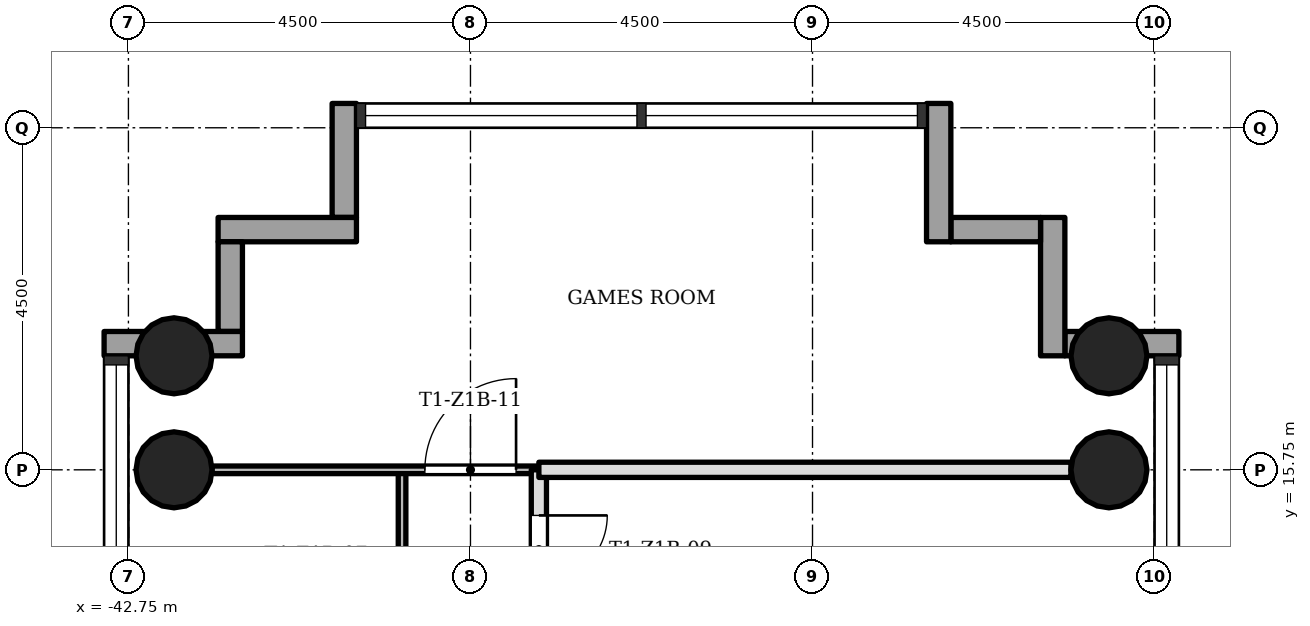
"""IFC4 building model, lengths in metres.
Left out: names, types, materials, properties, quantities, classifications, styles, units other than length and angle.
Written with IfcOpenShell. Run it as: python <this file> out.ifc"""

import sys

from ifc_helpers import new_model, si_unit, direction, frame, frame_2d, origin, origin_2d, place, context, subcontext, project, spatial, rectangle, hollow_circle, extrude, element, fill, save


model = new_model("IFC4")
c1 = context("Model", 3, precision=1e-05, world=origin(), true_north=direction((0.0, 1.0)))
c2 = subcontext(c1, "Body", "Model", "MODEL_VIEW")
j1 = project(units=[si_unit("LENGTHUNIT", "METRE"), si_unit("PLANEANGLEUNIT", "RADIAN")], contexts=[c1])
p1 = place(None, origin())
s1 = spatial("IfcSite", under=j1, at=p1, CompositionType="ELEMENT")
p2 = place(p1, origin())
s2 = spatial("IfcBuilding", under=s1, at=p2, CompositionType="ELEMENT")
p3 = place(p2, frame((0.0, 0.0, 34.7)))
s3 = spatial("IfcBuildingStorey", under=s2, at=p3, CompositionType="ELEMENT", Elevation=34.7)
for number, where, z_axis, x_axis in (
    (1, (-29.85, 15.75, 0.0), (0.0, 0.0, 1.0), (1.0, 0.0, 0.0)),
    (2, (-42.15, 15.75, 0.0), (0.0, 0.0, 1.0), (1.0, 0.0, 0.0)),
    (3, (-29.85, 17.25, 0.0), (0.0, 0.0, 1.0), (1.0, 0.0, 0.0)),
    (4, (-42.15, 17.25, 0.0), (0.0, 0.0, 1.0), (1.0, 0.0, 0.0)),
):
    element("IfcColumn", number, at=place(p3, frame(where, z_axis=z_axis, x_axis=x_axis)), inside=s3, PredefinedType="COLUMN", context=c2, shape_type="SweptSolid", body=[
        extrude(hollow_circle(Radius=0.5, WallThickness=0.036, at=origin_2d()), origin(), (0.0, 0.0, 1.0), 3.4),
    ])
p4 = place(p3, frame((-28.93, 17.41, -0.3), z_axis=(0.0, 0.0, 1.0), x_axis=(-1.0, 0.0, 0.0)))
e5 = element("IfcWall", 5, at=p4, inside=s3, PredefinedType="STANDARD", context=c2, shape_type="SweptSolid", body=[
    extrude(rectangle(XDim=1.5, YDim=0.32, at=frame_2d((0.75, 0.0))), origin(), (0.0, 0.0, 1.0), 3.4),
])
p5 = place(p3, frame((-30.59, 17.25, -0.3), z_axis=(0.0, 0.0, 1.0), x_axis=(0.0, 1.0, 0.0)))
e6 = element("IfcWall", 6, at=p5, inside=s3, PredefinedType="STANDARD", context=c2, shape_type="SweptSolid", body=[
    extrude(rectangle(XDim=1.82, YDim=0.32, at=frame_2d((0.91, 0.0))), origin(), (0.0, 0.0, 1.0), 3.4),
])
p6 = place(p3, frame((-30.75, 18.91, -0.3), z_axis=(0.0, 0.0, 1.0), x_axis=(-1.0, 0.0, 0.0)))
e7 = element("IfcWall", 7, at=p6, inside=s3, PredefinedType="STANDARD", context=c2, shape_type="SweptSolid", body=[
    extrude(rectangle(XDim=1.18, YDim=0.32, at=frame_2d((0.59, 0.0))), origin(), (0.0, 0.0, 1.0), 3.4),
])
p7 = place(p3, frame((-32.09, 18.75, -0.3), z_axis=(0.0, 0.0, 1.0), x_axis=(0.0, 1.0, 0.0)))
e8 = element("IfcWall", 8, at=p7, inside=s3, PredefinedType="STANDARD", context=c2, shape_type="SweptSolid", body=[
    extrude(rectangle(XDim=1.82, YDim=0.32, at=frame_2d((0.91, 0.0))), origin(), (0.0, 0.0, 1.0), 3.4),
])
p8 = place(p3, frame((-39.91, 20.57, -0.3), z_axis=(0.0, 0.0, 1.0), x_axis=(0.0, -1.0, 0.0)))
e9 = element("IfcWall", 9, at=p8, inside=s3, PredefinedType="STANDARD", context=c2, shape_type="SweptSolid", body=[
    extrude(rectangle(XDim=1.5, YDim=0.32, at=frame_2d((0.75, 0.0))), origin(), (0.0, 0.0, 1.0), 3.4),
])
p9 = place(p3, frame((-39.75, 18.91, -0.3), z_axis=(0.0, 0.0, 1.0), x_axis=(-1.0, 0.0, 0.0)))
e10 = element("IfcWall", 10, at=p9, inside=s3, PredefinedType="STANDARD", context=c2, shape_type="SweptSolid", body=[
    extrude(rectangle(XDim=1.82, YDim=0.32, at=frame_2d((0.91, 0.0))), origin(), (0.0, 0.0, 1.0), 3.4),
])
p10 = place(p3, frame((-41.41, 18.75, -0.3), z_axis=(0.0, 0.0, 1.0), x_axis=(0.0, -1.0, 0.0)))
e11 = element("IfcWall", 11, at=p10, inside=s3, PredefinedType="STANDARD", context=c2, shape_type="SweptSolid", body=[
    extrude(rectangle(XDim=1.18, YDim=0.32, at=frame_2d((0.59, 0.0))), origin(), (0.0, 0.0, 1.0), 3.4),
])
p11 = place(p3, frame((-41.25, 17.41, -0.3), z_axis=(0.0, 0.0, 1.0), x_axis=(-1.0, 0.0, 0.0)))
e12 = element("IfcWall", 12, at=p11, inside=s3, PredefinedType="STANDARD", context=c2, shape_type="SweptSolid", body=[
    extrude(rectangle(XDim=1.82, YDim=0.32, at=frame_2d((0.91, 0.0))), origin(), (0.0, 0.0, 1.0), 3.4),
])
p12 = place(p3, frame((-39.15, 6.75, 0.0), z_axis=(0.0, 0.0, 1.0), x_axis=(0.0, 1.0, 0.0)))
e13 = element("IfcWall", 13, at=p12, inside=s3, PredefinedType="PARTITIONING", context=c2, shape_type="SweptSolid", body=[
    extrude(rectangle(XDim=9.0, YDim=0.1, at=frame_2d((4.5, 0.0))), origin(), (0.0, 0.0, 1.0), 3.0),
])
p13 = place(p12, frame((1.8, 0.0, 0.0)))
e14 = element("IfcOpeningElement", 14, at=p13, cuts=e13, PredefinedType="OPENING", context=c2, shape_type="SweptSolid", body=[
    extrude(rectangle(XDim=0.9, YDim=2.1, at=frame_2d((0.45, 1.05))), frame((0.0, 0.06, 0.0), z_axis=(0.0, -1.0, 0.0), x_axis=(1.0, 0.0, 0.0)), (0.0, 0.0, 1.0), 0.12),
])
p14 = place(p12, frame((6.3, 0.0, 0.0)))
e15 = element("IfcOpeningElement", 15, at=p14, cuts=e13, PredefinedType="OPENING", context=c2, shape_type="SweptSolid", body=[
    extrude(rectangle(XDim=0.9, YDim=2.1, at=frame_2d((0.45, 1.05))), frame((0.0, 0.06, 0.0), z_axis=(0.0, -1.0, 0.0), x_axis=(1.0, 0.0, 0.0)), (0.0, 0.0, 1.0), 0.12),
])
p15 = place(p3, frame((-37.35, 11.25, 0.0), z_axis=(0.0, 0.0, 1.0), x_axis=(0.0, 1.0, 0.0)))
e16 = element("IfcWall", 16, at=p15, inside=s3, PredefinedType="SOLIDWALL", context=c2, shape_type="SweptSolid", body=[
    extrude(rectangle(XDim=4.5, YDim=0.2, at=frame_2d((2.25, 0.0))), origin(), (0.0, 0.0, 1.0), 3.0),
])
p16 = place(p15, frame((3.0, 0.0, 0.0)))
e17 = element("IfcOpeningElement", 17, at=p16, cuts=e16, PredefinedType="OPENING", context=c2, shape_type="SweptSolid", body=[
    extrude(rectangle(XDim=0.9, YDim=2.1, at=frame_2d((0.45, 1.05))), frame((0.0, 0.11, 0.0), z_axis=(0.0, -1.0, 0.0), x_axis=(1.0, 0.0, 0.0)), (0.0, 0.0, 1.0), 0.22),
])
p17 = place(p3, frame((-41.65, 15.75, 0.0), z_axis=(0.0, 0.0, 1.0), x_axis=(1.0, 0.0, 0.0)))
e18 = element("IfcWall", 18, at=p17, inside=s3, PredefinedType="PARTITIONING", context=c2, shape_type="SweptSolid", body=[
    extrude(rectangle(XDim=4.3, YDim=0.1, at=frame_2d((2.15, 0.0))), origin(), (0.0, 0.0, 1.0), 3.0),
])
p18 = place(p17, frame((2.8, 0.0, 0.0)))
e19 = element("IfcOpeningElement", 19, at=p18, cuts=e18, PredefinedType="OPENING", context=c2, shape_type="SweptSolid", body=[
    extrude(rectangle(XDim=1.2, YDim=2.1, at=frame_2d((0.6, 1.05))), frame((0.0, 0.06, 0.0), z_axis=(0.0, -1.0, 0.0), x_axis=(1.0, 0.0, 0.0)), (0.0, 0.0, 1.0), 0.12),
])
p19 = place(p3, frame((-37.35, 15.75, 0.0), z_axis=(0.0, 0.0, 1.0), x_axis=(1.0, 0.0, 0.0)))
e20 = element("IfcWall", 20, at=p19, inside=s3, PredefinedType="SOLIDWALL", context=c2, shape_type="SweptSolid", body=[
    extrude(rectangle(XDim=7.0, YDim=0.2, at=frame_2d((3.5, 0.0))), origin(), (0.0, 0.0, 1.0), 3.0),
])
p20 = place(p16, origin())
e21 = element("IfcDoor", 21, at=p20, inside=s3, OperationType="SINGLE_SWING_RIGHT", PredefinedType="DOOR", context=c2, shape_type="SweptSolid", body=[
    extrude(rectangle(XDim=0.9, YDim=2.1, at=frame_2d((0.45, 1.05))), frame((0.0, 0.025, 0.0), z_axis=(0.0, -1.0, 0.0), x_axis=(1.0, 0.0, 0.0)), (0.0, 0.0, 1.0), 0.05),
])
fill(e17, e21)
p21 = place(p18, origin())
e22 = element("IfcDoor", 22, at=p21, inside=s3, OperationType="SINGLE_SWING_LEFT", PredefinedType="DOOR", context=c2, shape_type="SweptSolid", body=[
    extrude(rectangle(XDim=1.2, YDim=2.1, at=frame_2d((0.6, 1.05))), frame((0.0, 0.025, 0.0), z_axis=(0.0, -1.0, 0.0), x_axis=(1.0, 0.0, 0.0)), (0.0, 0.0, 1.0), 0.05),
])
fill(e19, e22)
save(model, sys.argv[1])
